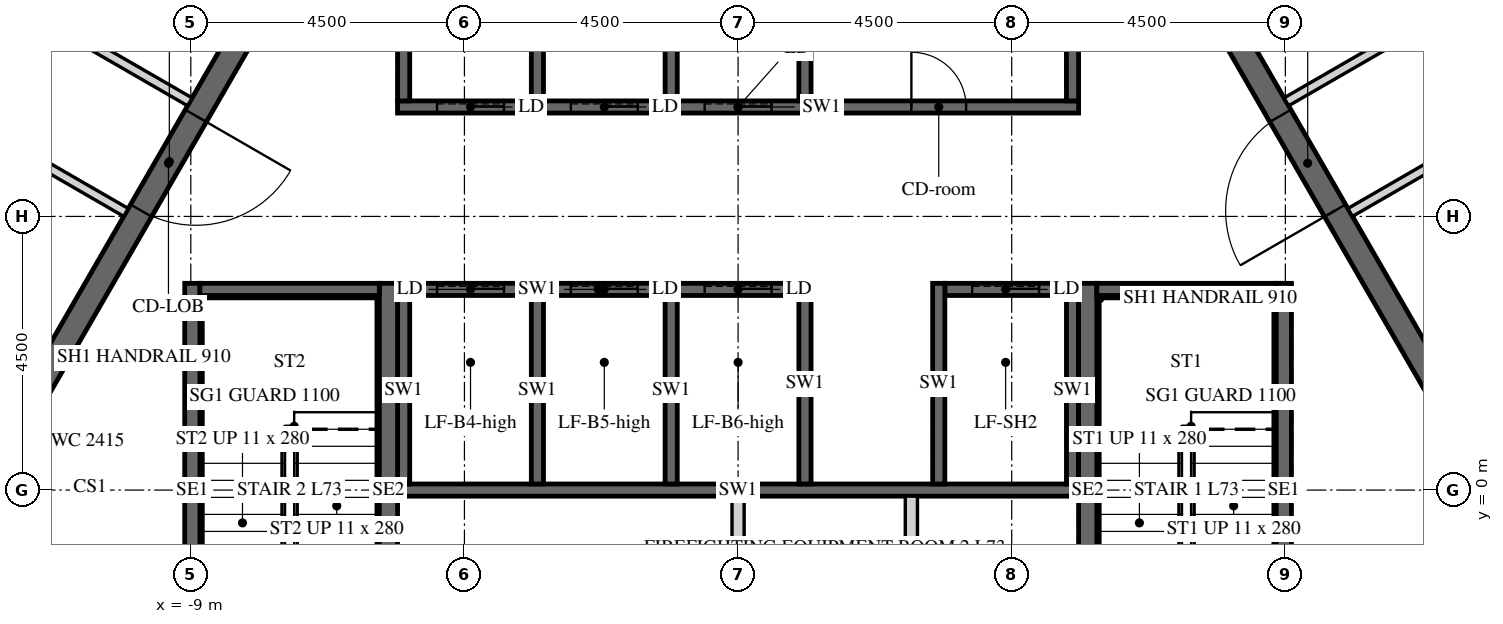
"""IFC4 building model, lengths in metres.
Left out: names, types, materials, properties, quantities, classifications, styles, units other than length and angle.
Written with IfcOpenShell. Run it as: python <this file> out.ifc"""

import sys

from ifc_helpers import new_model, si_unit, direction, frame, frame_2d, origin, place, context, subcontext, project, spatial, polyline, rectangle, outline, extrude, element, fill, save


model = new_model("IFC4")
c1 = context("Model", 3, precision=1e-05, world=origin(), true_north=direction((0.0, 1.0)))
c2 = subcontext(c1, "Body", "Model", "MODEL_VIEW")
j1 = project(units=[si_unit("LENGTHUNIT", "METRE"), si_unit("PLANEANGLEUNIT", "RADIAN")], contexts=[c1])
p1 = place(None, origin())
s1 = spatial("IfcSite", under=j1, at=p1, CompositionType="ELEMENT")
p2 = place(p1, origin())
s2 = spatial("IfcBuilding", under=s1, at=p2, CompositionType="ELEMENT")
p3 = place(p2, frame((0.0, 0.0, 303.0)))
s3 = spatial("IfcBuildingStorey", under=s2, at=p3, CompositionType="ELEMENT", Elevation=303.0)
p4 = place(p3, frame((-6.235, 10.8, -0.15), z_axis=(0.0, 0.0, 1.0), x_axis=(-0.499996419489, -0.866027470984, 0.0)))
e1 = element("IfcWall", 1, at=p4, inside=s3, PredefinedType="SHEAR", context=c2, shape_type="SweptSolid", body=[
    extrude(outline(polyline([(-0.115, -0.2), (12.586, -0.2), (12.355, 0.2), (0.115, 0.2), (-0.115, -0.2)])), origin(), (0.0, 0.0, 1.0), 3.9),
])
p5 = place(p4, frame((5.364, 0.0, 0.15)))
e2 = element("IfcOpeningElement", 2, at=p5, cuts=e1, PredefinedType="OPENING", context=c2, shape_type="SweptSolid", body=[
    extrude(rectangle(XDim=1.8, YDim=2.4, at=frame_2d((0.9, 1.2))), frame((0.0, 0.21, 0.0), z_axis=(0.0, -1.0, 0.0), x_axis=(1.0, 0.0, 0.0)), (0.0, 0.0, 1.0), 0.42),
])
p6 = place(p3, frame((-12.471, 0.0, -0.15), z_axis=(0.0, 0.0, 1.0), x_axis=(0.499996419489, -0.866027470984, 0.0)))
e3 = element("IfcWall", 3, at=p6, inside=s3, PredefinedType="SHEAR", context=c2, shape_type="SweptSolid", body=[
    extrude(outline(polyline([(-0.115, -0.2), (12.586, -0.2), (12.355, 0.2), (0.115, 0.2), (-0.115, -0.2)])), origin(), (0.0, 0.0, 1.0), 3.9),
])
p7 = place(p6, frame((5.306, 0.0, 0.15)))
e4 = element("IfcOpeningElement", 4, at=p7, cuts=e3, PredefinedType="OPENING", context=c2, shape_type="SweptSolid", body=[
    extrude(rectangle(XDim=1.8, YDim=2.4, at=frame_2d((0.9, 1.2))), frame((0.0, 0.21, 0.0), z_axis=(0.0, -1.0, 0.0), x_axis=(1.0, 0.0, 0.0)), (0.0, 0.0, 1.0), 0.42),
])
p8 = place(p3, frame((6.235, -10.8, -0.15), z_axis=(0.0, 0.0, 1.0), x_axis=(0.499996419489, 0.866027470984, 0.0)))
e5 = element("IfcWall", 5, at=p8, inside=s3, PredefinedType="SHEAR", context=c2, shape_type="SweptSolid", body=[
    extrude(outline(polyline([(-0.115, -0.2), (12.586, -0.2), (12.355, 0.2), (0.115, 0.2), (-0.115, -0.2)])), origin(), (0.0, 0.0, 1.0), 3.9),
])
p9 = place(p8, frame((5.364, 0.0, 0.15)))
e6 = element("IfcOpeningElement", 6, at=p9, cuts=e5, PredefinedType="OPENING", context=c2, shape_type="SweptSolid", body=[
    extrude(rectangle(XDim=1.8, YDim=2.4, at=frame_2d((0.9, 1.2))), frame((0.0, 0.21, 0.0), z_axis=(0.0, -1.0, 0.0), x_axis=(1.0, 0.0, 0.0)), (0.0, 0.0, 1.0), 0.42),
])
p10 = place(p3, frame((12.471, 0.0, -0.15), z_axis=(0.0, 0.0, 1.0), x_axis=(-0.499996419489, 0.866027470984, 0.0)))
e7 = element("IfcWall", 7, at=p10, inside=s3, PredefinedType="SHEAR", context=c2, shape_type="SweptSolid", body=[
    extrude(outline(polyline([(-0.115, -0.2), (12.586, -0.2), (12.355, 0.2), (0.115, 0.2), (-0.115, -0.2)])), origin(), (0.0, 0.0, 1.0), 3.9),
])
p11 = place(p10, frame((5.306, 0.0, 0.15)))
e8 = element("IfcOpeningElement", 8, at=p11, cuts=e7, PredefinedType="OPENING", context=c2, shape_type="SweptSolid", body=[
    extrude(rectangle(XDim=1.8, YDim=2.4, at=frame_2d((0.9, 1.2))), frame((0.0, 0.21, 0.0), z_axis=(0.0, -1.0, 0.0), x_axis=(1.0, 0.0, 0.0)), (0.0, 0.0, 1.0), 0.42),
])
p12 = place(p3, frame((-5.6, 6.3, -0.25), z_axis=(0.0, 0.0, 1.0), x_axis=(1.0, 0.0, 0.0)))
e9 = element("IfcWall", 9, at=p12, inside=s3, PredefinedType="SHEAR", context=c2, shape_type="SweptSolid", body=[
    extrude(rectangle(XDim=11.2, YDim=0.2, at=frame_2d((5.6, 0.0))), origin(), (0.0, 0.0, 1.0), 3.9),
])
p13 = place(p12, frame((8.45, 0.0, 0.25)))
e10 = element("IfcOpeningElement", 10, at=p13, cuts=e9, PredefinedType="OPENING", context=c2, shape_type="SweptSolid", body=[
    extrude(rectangle(XDim=0.9, YDim=2.1, at=frame_2d((0.45, 1.05))), frame((0.0, 0.11, 0.0), z_axis=(0.0, -1.0, 0.0), x_axis=(1.0, 0.0, 0.0)), (0.0, 0.0, 1.0), 0.22),
])
p14 = place(p12, frame((0.65, 0.0, 0.25)))
e11 = element("IfcOpeningElement", 11, at=p14, cuts=e9, PredefinedType="OPENING", context=c2, shape_type="SweptSolid", body=[
    extrude(rectangle(XDim=1.1, YDim=2.1, at=frame_2d((0.55, 1.05))), frame((0.0, 0.11, 0.0), z_axis=(0.0, -1.0, 0.0), x_axis=(1.0, 0.0, 0.0)), (0.0, 0.0, 1.0), 0.22),
])
p15 = place(p12, frame((2.85, 0.0, 0.25)))
e12 = element("IfcOpeningElement", 12, at=p15, cuts=e9, PredefinedType="OPENING", context=c2, shape_type="SweptSolid", body=[
    extrude(rectangle(XDim=1.1, YDim=2.1, at=frame_2d((0.55, 1.05))), frame((0.0, 0.11, 0.0), z_axis=(0.0, -1.0, 0.0), x_axis=(1.0, 0.0, 0.0)), (0.0, 0.0, 1.0), 0.22),
])
p16 = place(p12, frame((5.05, 0.0, 0.25)))
e13 = element("IfcOpeningElement", 13, at=p16, cuts=e9, PredefinedType="OPENING", context=c2, shape_type="SweptSolid", body=[
    extrude(rectangle(XDim=1.1, YDim=2.1, at=frame_2d((0.55, 1.05))), frame((0.0, 0.11, 0.0), z_axis=(0.0, -1.0, 0.0), x_axis=(1.0, 0.0, 0.0)), (0.0, 0.0, 1.0), 0.22),
])
for number, where, z_axis, x_axis in (
    (14, (-5.5, 6.4, -0.25), (0.0, 0.0, 1.0), (0.0, 1.0, 0.0)),
    (15, (-3.3, 6.4, -0.25), (0.0, 0.0, 1.0), (0.0, 1.0, 0.0)),
    (16, (-1.1, 6.4, -0.25), (0.0, 0.0, 1.0), (0.0, 1.0, 0.0)),
    (17, (1.1, 6.4, -0.25), (0.0, 0.0, 1.0), (0.0, 1.0, 0.0)),
    (18, (5.5, 6.4, -0.25), (0.0, 0.0, 1.0), (0.0, 1.0, 0.0)),
):
    element("IfcWall", number, at=place(p3, frame(where, z_axis=z_axis, x_axis=x_axis)), inside=s3, PredefinedType="SHEAR", context=c2, shape_type="SweptSolid", body=[
        extrude(rectangle(XDim=2.9, YDim=0.2, at=frame_2d((1.45, 0.0))), origin(), (0.0, 0.0, 1.0), 3.9),
    ])
p17 = place(p3, frame((-5.6, 3.3, -0.25), z_axis=(0.0, 0.0, 1.0), x_axis=(1.0, 0.0, 0.0)))
e19 = element("IfcWall", 19, at=p17, inside=s3, PredefinedType="SHEAR", context=c2, shape_type="SweptSolid", body=[
    extrude(rectangle(XDim=6.6, YDim=0.2, at=frame_2d((3.3, 0.0))), origin(), (0.0, 0.0, 1.0), 3.9),
])
p18 = place(p17, frame((0.65, 0.0, 0.25)))
e20 = element("IfcOpeningElement", 20, at=p18, cuts=e19, PredefinedType="OPENING", context=c2, shape_type="SweptSolid", body=[
    extrude(rectangle(XDim=1.1, YDim=2.1, at=frame_2d((0.55, 1.05))), frame((0.0, 0.11, 0.0), z_axis=(0.0, -1.0, 0.0), x_axis=(1.0, 0.0, 0.0)), (0.0, 0.0, 1.0), 0.22),
])
p19 = place(p17, frame((2.85, 0.0, 0.25)))
e21 = element("IfcOpeningElement", 21, at=p19, cuts=e19, PredefinedType="OPENING", context=c2, shape_type="SweptSolid", body=[
    extrude(rectangle(XDim=1.1, YDim=2.1, at=frame_2d((0.55, 1.05))), frame((0.0, 0.11, 0.0), z_axis=(0.0, -1.0, 0.0), x_axis=(1.0, 0.0, 0.0)), (0.0, 0.0, 1.0), 0.22),
])
p20 = place(p17, frame((5.05, 0.0, 0.25)))
e22 = element("IfcOpeningElement", 22, at=p20, cuts=e19, PredefinedType="OPENING", context=c2, shape_type="SweptSolid", body=[
    extrude(rectangle(XDim=1.1, YDim=2.1, at=frame_2d((0.55, 1.05))), frame((0.0, 0.11, 0.0), z_axis=(0.0, -1.0, 0.0), x_axis=(1.0, 0.0, 0.0)), (0.0, 0.0, 1.0), 0.22),
])
p21 = place(p3, frame((3.4, 3.3, -0.25), z_axis=(0.0, 0.0, 1.0), x_axis=(1.0, 0.0, 0.0)))
e23 = element("IfcWall", 23, at=p21, inside=s3, PredefinedType="SHEAR", context=c2, shape_type="SweptSolid", body=[
    extrude(rectangle(XDim=2.2, YDim=0.2, at=frame_2d((1.1, 0.0))), origin(), (0.0, 0.0, 1.0), 3.9),
])
p22 = place(p21, frame((0.45, 0.0, 0.25)))
e24 = element("IfcOpeningElement", 24, at=p22, cuts=e23, PredefinedType="OPENING", context=c2, shape_type="SweptSolid", body=[
    extrude(rectangle(XDim=1.1, YDim=2.1, at=frame_2d((0.55, 1.05))), frame((0.0, 0.11, 0.0), z_axis=(0.0, -1.0, 0.0), x_axis=(1.0, 0.0, 0.0)), (0.0, 0.0, 1.0), 0.22),
])
p23 = place(p3, frame((-5.6, 0.0, -0.25), z_axis=(0.0, 0.0, 1.0), x_axis=(1.0, 0.0, 0.0)))
e25 = element("IfcWall", 25, at=p23, inside=s3, PredefinedType="SHEAR", context=c2, shape_type="SweptSolid", body=[
    extrude(rectangle(XDim=11.2, YDim=0.2, at=frame_2d((5.6, 0.0))), origin(), (0.0, 0.0, 1.0), 3.9),
])
for number, where, z_axis, x_axis in (
    (26, (-5.5, 0.1, -0.25), (0.0, 0.0, 1.0), (0.0, 1.0, 0.0)),
    (27, (-3.3, 0.1, -0.25), (0.0, 0.0, 1.0), (0.0, 1.0, 0.0)),
    (28, (-1.1, 0.1, -0.25), (0.0, 0.0, 1.0), (0.0, 1.0, 0.0)),
):
    element("IfcWall", number, at=place(p3, frame(where, z_axis=z_axis, x_axis=x_axis)), inside=s3, PredefinedType="SHEAR", context=c2, shape_type="SweptSolid", body=[
        extrude(rectangle(XDim=3.1, YDim=0.2, at=frame_2d((1.55, 0.0))), origin(), (0.0, 0.0, 1.0), 3.9),
    ])
for number, where, z_axis, x_axis in (
    (29, (1.1, 0.1, -0.25), (0.0, 0.0, 1.0), (0.0, 1.0, 0.0)),
    (30, (3.3, 0.1, -0.25), (0.0, 0.0, 1.0), (0.0, 1.0, 0.0)),
):
    element("IfcWall", number, at=place(p3, frame(where, z_axis=z_axis, x_axis=x_axis)), inside=s3, PredefinedType="SHEAR", context=c2, shape_type="SweptSolid", body=[
        extrude(rectangle(XDim=3.3, YDim=0.2, at=frame_2d((1.65, 0.0))), origin(), (0.0, 0.0, 1.0), 3.9),
    ])
p24 = place(p3, frame((5.5, 0.1, -0.25), z_axis=(0.0, 0.0, 1.0), x_axis=(0.0, 1.0, 0.0)))
e31 = element("IfcWall", 31, at=p24, inside=s3, PredefinedType="SHEAR", context=c2, shape_type="SweptSolid", body=[
    extrude(rectangle(XDim=3.1, YDim=0.2, at=frame_2d((1.55, 0.0))), origin(), (0.0, 0.0, 1.0), 3.9),
])
p25 = place(p3, frame((2.85, -3.2, 0.0), z_axis=(0.0, 0.0, 1.0), x_axis=(0.0, 1.0, 0.0)))
e32 = element("IfcWall", 32, at=p25, inside=s3, PredefinedType="PARTITIONING", context=c2, shape_type="SweptSolid", body=[
    extrude(rectangle(XDim=3.1, YDim=0.2, at=frame_2d((1.55, 0.0))), origin(), (0.0, 0.0, 1.0), 3.65),
])
p26 = place(p3, frame((0.0, -6.2, 0.0), z_axis=(0.0, 0.0, 1.0), x_axis=(0.0, 1.0, 0.0)))
e33 = element("IfcWall", 33, at=p26, inside=s3, PredefinedType="PARTITIONING", context=c2, shape_type="SweptSolid", body=[
    extrude(rectangle(XDim=6.1, YDim=0.2, at=frame_2d((3.05, 0.0))), origin(), (0.0, 0.0, 1.0), 3.65),
])
p27 = place(p3, frame((5.75, -3.4, -0.25), z_axis=(0.0, 0.0, 1.0), x_axis=(0.0, 1.0, 0.0)))
e34 = element("IfcWall", 34, at=p27, inside=s3, PredefinedType="SHEAR", context=c2, shape_type="SweptSolid", body=[
    extrude(rectangle(XDim=6.8, YDim=0.3, at=frame_2d((3.4, 0.0))), origin(), (0.0, 0.0, 1.0), 3.9),
])
p28 = place(p3, frame((8.975, -3.4, -0.25), z_axis=(0.0, 0.0, 1.0), x_axis=(0.0, 1.0, 0.0)))
e35 = element("IfcWall", 35, at=p28, inside=s3, PredefinedType="SHEAR", context=c2, shape_type="SweptSolid", body=[
    extrude(rectangle(XDim=6.8, YDim=0.25, at=frame_2d((3.4, 0.0))), origin(), (0.0, 0.0, 1.0), 3.9),
])
p29 = place(p3, frame((5.9, 3.3, -0.25), z_axis=(0.0, 0.0, 1.0), x_axis=(1.0, 0.0, 0.0)))
e36 = element("IfcWall", 36, at=p29, inside=s3, PredefinedType="SHEAR", context=c2, shape_type="SweptSolid", body=[
    extrude(rectangle(XDim=2.95, YDim=0.2, at=frame_2d((1.475, 0.0))), origin(), (0.0, 0.0, 1.0), 3.9),
])
p30 = place(p3, frame((-5.75, -3.4, -0.25), z_axis=(0.0, 0.0, 1.0), x_axis=(0.0, 1.0, 0.0)))
e37 = element("IfcWall", 37, at=p30, inside=s3, PredefinedType="SHEAR", context=c2, shape_type="SweptSolid", body=[
    extrude(rectangle(XDim=6.8, YDim=0.3, at=frame_2d((3.4, 0.0))), origin(), (0.0, 0.0, 1.0), 3.9),
])
p31 = place(p3, frame((-8.975, -3.4, -0.25), z_axis=(0.0, 0.0, 1.0), x_axis=(0.0, 1.0, 0.0)))
e38 = element("IfcWall", 38, at=p31, inside=s3, PredefinedType="SHEAR", context=c2, shape_type="SweptSolid", body=[
    extrude(rectangle(XDim=6.8, YDim=0.25, at=frame_2d((3.4, 0.0))), origin(), (0.0, 0.0, 1.0), 3.9),
])
p32 = place(p3, frame((-8.85, 3.3, -0.25), z_axis=(0.0, 0.0, 1.0), x_axis=(1.0, 0.0, 0.0)))
e39 = element("IfcWall", 39, at=p32, inside=s3, PredefinedType="SHEAR", context=c2, shape_type="SweptSolid", body=[
    extrude(rectangle(XDim=2.95, YDim=0.2, at=frame_2d((1.475, 0.0))), origin(), (0.0, 0.0, 1.0), 3.9),
])
p33 = place(p3, frame((-8.434, 16.925, 0.0), z_axis=(0.0, 0.0, 1.0), x_axis=(-0.438371383278, -0.898793930956, 0.0)))
e40 = element("IfcWall", 40, at=p33, inside=s3, PredefinedType="PARTITIONING", context=c2, shape_type="SweptSolid", body=[
    extrude(rectangle(XDim=16.939, YDim=0.15, at=frame_2d((8.47, 0.0))), origin(), (0.0, 0.0, 1.0), 2.988),
])
p34 = place(p33, frame((9.89, 0.0, 0.0)))
e41 = element("IfcOpeningElement", 41, at=p34, cuts=e40, PredefinedType="OPENING", context=c2, shape_type="SweptSolid", body=[
    extrude(rectangle(XDim=1.0, YDim=2.1, at=frame_2d((0.5, 1.05))), frame((0.0, 0.085, 0.0), z_axis=(0.0, -1.0, 0.0), x_axis=(1.0, 0.0, 0.0)), (0.0, 0.0, 1.0), 0.17),
])
p35 = place(p3, frame((-9.016, 6.384, 0.0), z_axis=(0.0, 0.0, 1.0), x_axis=(-0.866031051173, 0.499990218309, 0.0)))
e42 = element("IfcWall", 42, at=p35, inside=s3, PredefinedType="PARTITIONING", context=c2, shape_type="SweptSolid", body=[
    extrude(rectangle(XDim=2.604, YDim=0.15, at=frame_2d((1.302, 0.0))), origin(), (0.0, 0.0, 1.0), 2.988),
])
p36 = place(p3, frame((-12.129, 5.757, 0.0), z_axis=(0.0, 0.0, 1.0), x_axis=(0.866033707122, -0.499985617921, 0.0)))
e43 = element("IfcWall", 43, at=p36, inside=s3, PredefinedType="PARTITIONING", context=c2, shape_type="SweptSolid", body=[
    extrude(rectangle(XDim=2.382, YDim=0.15, at=frame_2d((1.191, 0.0))), origin(), (0.0, 0.0, 1.0), 2.988),
])
p37 = place(p3, frame((18.875, -1.158, 0.0), z_axis=(0.0, 0.0, 1.0), x_axis=(-0.55919880344, 0.829033592945, 0.0)))
e44 = element("IfcWall", 44, at=p37, inside=s3, PredefinedType="PARTITIONING", context=c2, shape_type="SweptSolid", body=[
    extrude(rectangle(XDim=16.939, YDim=0.15, at=frame_2d((8.47, 0.0))), origin(), (0.0, 0.0, 1.0), 2.988),
])
p38 = place(p37, frame((4.09, 0.0, 0.0)))
e45 = element("IfcOpeningElement", 45, at=p38, cuts=e44, PredefinedType="OPENING", context=c2, shape_type="SweptSolid", body=[
    extrude(rectangle(XDim=1.0, YDim=2.1, at=frame_2d((0.5, 1.05))), frame((0.0, 0.085, 0.0), z_axis=(0.0, -1.0, 0.0), x_axis=(1.0, 0.0, 0.0)), (0.0, 0.0, 1.0), 0.17),
])
p39 = place(p37, frame((15.39, 0.0, 0.0)))
e46 = element("IfcOpeningElement", 46, at=p39, cuts=e44, PredefinedType="OPENING", context=c2, shape_type="SweptSolid", body=[
    extrude(rectangle(XDim=1.0, YDim=2.1, at=frame_2d((0.5, 1.05))), frame((0.0, 0.085, 0.0), z_axis=(0.0, -1.0, 0.0), x_axis=(1.0, 0.0, 0.0)), (0.0, 0.0, 1.0), 0.17),
])
p40 = place(p3, frame((10.066, 4.566, 0.0), z_axis=(0.0, 0.0, 1.0), x_axis=(0.866034402474, 0.499984413489, 0.0)))
e47 = element("IfcWall", 47, at=p40, inside=s3, PredefinedType="PARTITIONING", context=c2, shape_type="SweptSolid", body=[
    extrude(rectangle(XDim=2.608, YDim=0.15, at=frame_2d((1.304, 0.0))), origin(), (0.0, 0.0, 1.0), 2.988),
])
p41 = place(p3, frame((11.082, 7.578, 0.0), z_axis=(0.0, 0.0, 1.0), x_axis=(-0.865993065409, -0.500056007527, 0.0)))
e48 = element("IfcWall", 48, at=p41, inside=s3, PredefinedType="PARTITIONING", context=c2, shape_type="SweptSolid", body=[
    extrude(rectangle(XDim=2.386, YDim=0.15, at=frame_2d((1.193, 0.0))), origin(), (0.0, 0.0, 1.0), 2.988),
])
p42 = place(p5, origin())
e49 = element("IfcDoor", 49, at=p42, inside=s3, OperationType="DOUBLE_DOOR_SINGLE_SWING", PredefinedType="DOOR", context=c2, shape_type="SweptSolid", body=[
    extrude(rectangle(XDim=1.8, YDim=2.4, at=frame_2d((0.9, 1.2))), frame((0.0, 0.025, 0.0), z_axis=(0.0, -1.0, 0.0), x_axis=(1.0, 0.0, 0.0)), (0.0, 0.0, 1.0), 0.05),
])
fill(e2, e49)
p43 = place(p11, origin())
e50 = element("IfcDoor", 50, at=p43, inside=s3, OperationType="DOUBLE_DOOR_SINGLE_SWING", PredefinedType="DOOR", context=c2, shape_type="SweptSolid", body=[
    extrude(rectangle(XDim=1.8, YDim=2.4, at=frame_2d((0.9, 1.2))), frame((0.0, 0.025, 0.0), z_axis=(0.0, -1.0, 0.0), x_axis=(1.0, 0.0, 0.0)), (0.0, 0.0, 1.0), 0.05),
])
fill(e8, e50)
p44 = place(p13, origin())
e51 = element("IfcDoor", 51, at=p44, inside=s3, OperationType="SINGLE_SWING_LEFT", PredefinedType="DOOR", context=c2, shape_type="SweptSolid", body=[
    extrude(rectangle(XDim=0.9, YDim=2.1, at=frame_2d((0.45, 1.05))), frame((0.0, 0.025, 0.0), z_axis=(0.0, -1.0, 0.0), x_axis=(1.0, 0.0, 0.0)), (0.0, 0.0, 1.0), 0.05),
])
fill(e10, e51)
p45 = place(p14, origin())
e52 = element("IfcDoor", 52, at=p45, inside=s3, OperationType="SLIDING_TO_LEFT", PredefinedType="DOOR", context=c2, shape_type="SweptSolid", body=[
    extrude(rectangle(XDim=1.1, YDim=2.1, at=frame_2d((0.55, 1.05))), frame((0.0, 0.025, 0.0), z_axis=(0.0, -1.0, 0.0), x_axis=(1.0, 0.0, 0.0)), (0.0, 0.0, 1.0), 0.05),
])
fill(e11, e52)
p46 = place(p15, origin())
e53 = element("IfcDoor", 53, at=p46, inside=s3, OperationType="SLIDING_TO_LEFT", PredefinedType="DOOR", context=c2, shape_type="SweptSolid", body=[
    extrude(rectangle(XDim=1.1, YDim=2.1, at=frame_2d((0.55, 1.05))), frame((0.0, 0.025, 0.0), z_axis=(0.0, -1.0, 0.0), x_axis=(1.0, 0.0, 0.0)), (0.0, 0.0, 1.0), 0.05),
])
fill(e12, e53)
p47 = place(p16, origin())
e54 = element("IfcDoor", 54, at=p47, inside=s3, OperationType="SLIDING_TO_LEFT", PredefinedType="DOOR", context=c2, shape_type="SweptSolid", body=[
    extrude(rectangle(XDim=1.1, YDim=2.1, at=frame_2d((0.55, 1.05))), frame((0.0, 0.025, 0.0), z_axis=(0.0, -1.0, 0.0), x_axis=(1.0, 0.0, 0.0)), (0.0, 0.0, 1.0), 0.05),
])
fill(e13, e54)
p48 = place(p18, origin())
e55 = element("IfcDoor", 55, at=p48, inside=s3, OperationType="SLIDING_TO_LEFT", PredefinedType="DOOR", context=c2, shape_type="SweptSolid", body=[
    extrude(rectangle(XDim=1.1, YDim=2.1, at=frame_2d((0.55, 1.05))), frame((0.0, 0.025, 0.0), z_axis=(0.0, -1.0, 0.0), x_axis=(1.0, 0.0, 0.0)), (0.0, 0.0, 1.0), 0.05),
])
fill(e20, e55)
p49 = place(p19, origin())
e56 = element("IfcDoor", 56, at=p49, inside=s3, OperationType="SLIDING_TO_LEFT", PredefinedType="DOOR", context=c2, shape_type="SweptSolid", body=[
    extrude(rectangle(XDim=1.1, YDim=2.1, at=frame_2d((0.55, 1.05))), frame((0.0, 0.025, 0.0), z_axis=(0.0, -1.0, 0.0), x_axis=(1.0, 0.0, 0.0)), (0.0, 0.0, 1.0), 0.05),
])
fill(e21, e56)
p50 = place(p20, origin())
e57 = element("IfcDoor", 57, at=p50, inside=s3, OperationType="SLIDING_TO_LEFT", PredefinedType="DOOR", context=c2, shape_type="SweptSolid", body=[
    extrude(rectangle(XDim=1.1, YDim=2.1, at=frame_2d((0.55, 1.05))), frame((0.0, 0.025, 0.0), z_axis=(0.0, -1.0, 0.0), x_axis=(1.0, 0.0, 0.0)), (0.0, 0.0, 1.0), 0.05),
])
fill(e22, e57)
p51 = place(p22, origin())
e58 = element("IfcDoor", 58, at=p51, inside=s3, OperationType="SLIDING_TO_LEFT", PredefinedType="DOOR", context=c2, shape_type="SweptSolid", body=[
    extrude(rectangle(XDim=1.1, YDim=2.1, at=frame_2d((0.55, 1.05))), frame((0.0, 0.025, 0.0), z_axis=(0.0, -1.0, 0.0), x_axis=(1.0, 0.0, 0.0)), (0.0, 0.0, 1.0), 0.05),
])
fill(e24, e58)
save(model, sys.argv[1])
